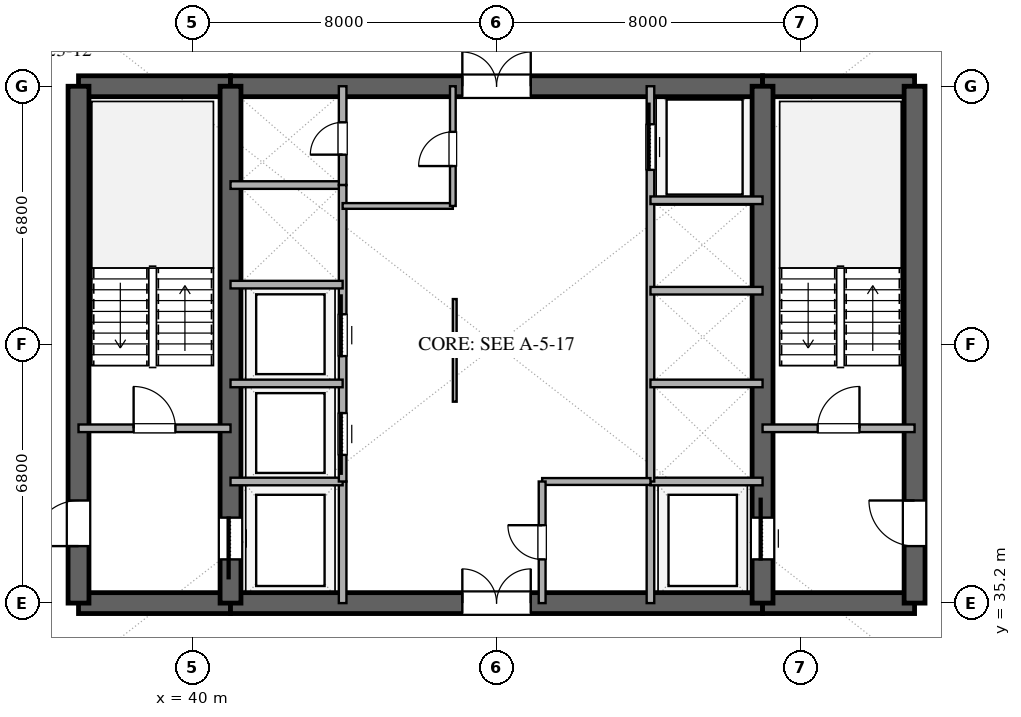
"""IFC4 building model, lengths in metres.
Left out: names, types, materials, properties, quantities, classifications, styles, units other than length and angle.
Written with IfcOpenShell. Run it as: python <this file> out.ifc"""

import sys

from ifc_helpers import new_model, si_unit, direction, frame, frame_2d, origin, place, context, subcontext, project, spatial, rectangle, extrude, element, fill, save


model = new_model("IFC4")
c1 = context("Model", 3, precision=1e-05, world=origin(), true_north=direction((0.0, 1.0)))
c2 = subcontext(c1, "Body", "Model", "MODEL_VIEW")
j1 = project(units=[si_unit("LENGTHUNIT", "METRE"), si_unit("PLANEANGLEUNIT", "RADIAN")], contexts=[c1])
p1 = place(None, origin())
s1 = spatial("IfcSite", under=j1, at=p1, CompositionType="ELEMENT")
p2 = place(p1, origin())
s2 = spatial("IfcBuilding", under=s1, at=p2, CompositionType="ELEMENT")
p3 = place(p2, frame((0.0, 0.0, 94.8)))
s3 = spatial("IfcBuildingStorey", under=s2, at=p3, CompositionType="ELEMENT", Elevation=94.8)
p4 = place(p3, frame((37.0, 35.2, 0.0), z_axis=(0.0, 0.0, 1.0), x_axis=(1.0, 0.0, 0.0)))
e1 = element("IfcWall", 1, at=p4, inside=s3, PredefinedType="SHEAR", context=c2, shape_type="SweptSolid", body=[
    extrude(rectangle(XDim=4.0, YDim=0.55, at=frame_2d((2.0, 0.0))), origin(), (0.0, 0.0, 1.0), 3.38),
])
p5 = place(p3, frame((41.0, 35.2, 0.0), z_axis=(0.0, 0.0, 1.0), x_axis=(1.0, 0.0, 0.0)))
e2 = element("IfcWall", 2, at=p5, inside=s3, PredefinedType="SHEAR", context=c2, shape_type="SweptSolid", body=[
    extrude(rectangle(XDim=14.0, YDim=0.55, at=frame_2d((7.0, 0.0))), origin(), (0.0, 0.0, 1.0), 3.38),
])
p6 = place(p5, frame((6.1, 0.0, 0.0)))
e3 = element("IfcOpeningElement", 3, at=p6, cuts=e2, PredefinedType="OPENING", context=c2, shape_type="SweptSolid", body=[
    extrude(rectangle(XDim=1.8, YDim=2.25, at=frame_2d((0.9, 1.125))), frame((0.0, 0.285, 0.0), z_axis=(0.0, -1.0, 0.0), x_axis=(1.0, 0.0, 0.0)), (0.0, 0.0, 1.0), 0.57),
])
for number, where, z_axis, x_axis in (
    (4, (55.0, 35.2, 0.0), (0.0, 0.0, 1.0), (1.0, 0.0, 0.0)),
    (5, (37.0, 48.8, 0.0), (0.0, 0.0, 1.0), (1.0, 0.0, 0.0)),
):
    element("IfcWall", number, at=place(p3, frame(where, z_axis=z_axis, x_axis=x_axis)), inside=s3, PredefinedType="SHEAR", context=c2, shape_type="SweptSolid", body=[
        extrude(rectangle(XDim=4.0, YDim=0.55, at=frame_2d((2.0, 0.0))), origin(), (0.0, 0.0, 1.0), 3.38),
    ])
p7 = place(p3, frame((41.0, 48.8, 0.0), z_axis=(0.0, 0.0, 1.0), x_axis=(1.0, 0.0, 0.0)))
e6 = element("IfcWall", 6, at=p7, inside=s3, PredefinedType="SHEAR", context=c2, shape_type="SweptSolid", body=[
    extrude(rectangle(XDim=14.0, YDim=0.55, at=frame_2d((7.0, 0.0))), origin(), (0.0, 0.0, 1.0), 3.38),
])
p8 = place(p7, frame((6.1, 0.0, 0.0)))
e7 = element("IfcOpeningElement", 7, at=p8, cuts=e6, PredefinedType="OPENING", context=c2, shape_type="SweptSolid", body=[
    extrude(rectangle(XDim=1.8, YDim=2.25, at=frame_2d((0.9, 1.125))), frame((0.0, 0.285, 0.0), z_axis=(0.0, -1.0, 0.0), x_axis=(1.0, 0.0, 0.0)), (0.0, 0.0, 1.0), 0.57),
])
p9 = place(p3, frame((55.0, 48.8, 0.0), z_axis=(0.0, 0.0, 1.0), x_axis=(1.0, 0.0, 0.0)))
e8 = element("IfcWall", 8, at=p9, inside=s3, PredefinedType="SHEAR", context=c2, shape_type="SweptSolid", body=[
    extrude(rectangle(XDim=4.0, YDim=0.55, at=frame_2d((2.0, 0.0))), origin(), (0.0, 0.0, 1.0), 3.38),
])
p10 = place(p3, frame((37.0, 35.2, 0.0), z_axis=(0.0, 0.0, 1.0), x_axis=(0.0, 1.0, 0.0)))
e9 = element("IfcWall", 9, at=p10, inside=s3, PredefinedType="SHEAR", context=c2, shape_type="SweptSolid", body=[
    extrude(rectangle(XDim=13.6, YDim=0.55, at=frame_2d((6.8, 0.0))), origin(), (0.0, 0.0, 1.0), 3.38),
])
p11 = place(p10, frame((1.5, 0.0, 0.0)))
e10 = element("IfcOpeningElement", 10, at=p11, cuts=e9, PredefinedType="OPENING", context=c2, shape_type="SweptSolid", body=[
    extrude(rectangle(XDim=1.2, YDim=2.15, at=frame_2d((0.6, 1.075))), frame((0.0, 0.285, 0.0), z_axis=(0.0, -1.0, 0.0), x_axis=(1.0, 0.0, 0.0)), (0.0, 0.0, 1.0), 0.57),
])
p12 = place(p3, frame((59.0, 35.2, 0.0), z_axis=(0.0, 0.0, 1.0), x_axis=(0.0, 1.0, 0.0)))
e11 = element("IfcWall", 11, at=p12, inside=s3, PredefinedType="SHEAR", context=c2, shape_type="SweptSolid", body=[
    extrude(rectangle(XDim=13.6, YDim=0.55, at=frame_2d((6.8, 0.0))), origin(), (0.0, 0.0, 1.0), 3.38),
])
p13 = place(p12, frame((1.5, 0.0, 0.0)))
e12 = element("IfcOpeningElement", 12, at=p13, cuts=e11, PredefinedType="OPENING", context=c2, shape_type="SweptSolid", body=[
    extrude(rectangle(XDim=1.2, YDim=2.15, at=frame_2d((0.6, 1.075))), frame((0.0, 0.285, 0.0), z_axis=(0.0, -1.0, 0.0), x_axis=(1.0, 0.0, 0.0)), (0.0, 0.0, 1.0), 0.57),
])
p14 = place(p3, frame((41.0, 35.2, 0.0), z_axis=(0.0, 0.0, 1.0), x_axis=(0.0, 1.0, 0.0)))
e13 = element("IfcWall", 13, at=p14, inside=s3, PredefinedType="SHEAR", context=c2, shape_type="SweptSolid", body=[
    extrude(rectangle(XDim=13.6, YDim=0.55, at=frame_2d((6.8, 0.0))), origin(), (0.0, 0.0, 1.0), 3.38),
])
p15 = place(p14, frame((1.15, 0.0, 0.0)))
e14 = element("IfcOpeningElement", 14, at=p15, cuts=e13, PredefinedType="OPENING", context=c2, shape_type="SweptSolid", body=[
    extrude(rectangle(XDim=1.1, YDim=2.2, at=frame_2d((0.55, 1.1))), frame((0.0, 0.285, 0.0), z_axis=(0.0, -1.0, 0.0), x_axis=(1.0, 0.0, 0.0)), (0.0, 0.0, 1.0), 0.57),
])
p16 = place(p3, frame((55.0, 35.2, 0.0), z_axis=(0.0, 0.0, 1.0), x_axis=(0.0, 1.0, 0.0)))
e15 = element("IfcWall", 15, at=p16, inside=s3, PredefinedType="SHEAR", context=c2, shape_type="SweptSolid", body=[
    extrude(rectangle(XDim=13.6, YDim=0.55, at=frame_2d((6.8, 0.0))), origin(), (0.0, 0.0, 1.0), 3.38),
])
p17 = place(p16, frame((1.15, 0.0, 0.0)))
e16 = element("IfcOpeningElement", 16, at=p17, cuts=e15, PredefinedType="OPENING", context=c2, shape_type="SweptSolid", body=[
    extrude(rectangle(XDim=1.1, YDim=2.2, at=frame_2d((0.55, 1.1))), frame((0.0, 0.285, 0.0), z_axis=(0.0, -1.0, 0.0), x_axis=(1.0, 0.0, 0.0)), (0.0, 0.0, 1.0), 0.57),
])
p18 = place(p3, frame((37.0, 39.8, 0.0), z_axis=(0.0, 0.0, 1.0), x_axis=(1.0, 0.0, 0.0)))
e17 = element("IfcWall", 17, at=p18, inside=s3, PredefinedType="SOLIDWALL", context=c2, shape_type="SweptSolid", body=[
    extrude(rectangle(XDim=4.0, YDim=0.2, at=frame_2d((2.0, 0.0))), origin(), (0.0, 0.0, 1.0), 2.74),
])
p19 = place(p18, frame((1.45, 0.0, 0.0)))
e18 = element("IfcOpeningElement", 18, at=p19, cuts=e17, PredefinedType="OPENING", context=c2, shape_type="SweptSolid", body=[
    extrude(rectangle(XDim=1.1, YDim=2.15, at=frame_2d((0.55, 1.075))), frame((0.0, 0.11, 0.0), z_axis=(0.0, -1.0, 0.0), x_axis=(1.0, 0.0, 0.0)), (0.0, 0.0, 1.0), 0.22),
])
p20 = place(p3, frame((55.0, 39.8, 0.0), z_axis=(0.0, 0.0, 1.0), x_axis=(1.0, 0.0, 0.0)))
e19 = element("IfcWall", 19, at=p20, inside=s3, PredefinedType="SOLIDWALL", context=c2, shape_type="SweptSolid", body=[
    extrude(rectangle(XDim=4.0, YDim=0.2, at=frame_2d((2.0, 0.0))), origin(), (0.0, 0.0, 1.0), 2.74),
])
p21 = place(p20, frame((1.45, 0.0, 0.0)))
e20 = element("IfcOpeningElement", 20, at=p21, cuts=e19, PredefinedType="OPENING", context=c2, shape_type="SweptSolid", body=[
    extrude(rectangle(XDim=1.1, YDim=2.15, at=frame_2d((0.55, 1.075))), frame((0.0, 0.11, 0.0), z_axis=(0.0, -1.0, 0.0), x_axis=(1.0, 0.0, 0.0)), (0.0, 0.0, 1.0), 0.22),
])
p22 = place(p3, frame((43.95, 35.2, 0.0), z_axis=(0.0, 0.0, 1.0), x_axis=(0.0, 1.0, 0.0)))
e21 = element("IfcWall", 21, at=p22, inside=s3, PredefinedType="SOLIDWALL", context=c2, shape_type="SweptSolid", body=[
    extrude(rectangle(XDim=3.2, YDim=0.2, at=frame_2d((1.6, 0.0))), origin(), (0.0, 0.0, 1.0), 2.74),
])
p23 = place(p3, frame((41.0, 38.4, 0.0), z_axis=(0.0, 0.0, 1.0), x_axis=(1.0, 0.0, 0.0)))
e22 = element("IfcWall", 22, at=p23, inside=s3, PredefinedType="SOLIDWALL", context=c2, shape_type="SweptSolid", body=[
    extrude(rectangle(XDim=2.95, YDim=0.2, at=frame_2d((1.475, 0.0))), origin(), (0.0, 0.0, 1.0), 2.74),
])
p24 = place(p3, frame((52.05, 35.2, 0.0), z_axis=(0.0, 0.0, 1.0), x_axis=(0.0, 1.0, 0.0)))
e23 = element("IfcWall", 23, at=p24, inside=s3, PredefinedType="SOLIDWALL", context=c2, shape_type="SweptSolid", body=[
    extrude(rectangle(XDim=3.2, YDim=0.2, at=frame_2d((1.6, 0.0))), origin(), (0.0, 0.0, 1.0), 2.74),
])
for number, where, z_axis, x_axis in (
    (24, (52.05, 38.4, 0.0), (0.0, 0.0, 1.0), (1.0, 0.0, 0.0)),
    (25, (41.0, 46.2, 0.0), (0.0, 0.0, 1.0), (1.0, 0.0, 0.0)),
):
    element("IfcWall", number, at=place(p3, frame(where, z_axis=z_axis, x_axis=x_axis)), inside=s3, PredefinedType="SOLIDWALL", context=c2, shape_type="SweptSolid", body=[
        extrude(rectangle(XDim=2.95, YDim=0.2, at=frame_2d((1.475, 0.0))), origin(), (0.0, 0.0, 1.0), 2.74),
    ])
p25 = place(p3, frame((43.95, 46.2, 0.0), z_axis=(0.0, 0.0, 1.0), x_axis=(0.0, 1.0, 0.0)))
e26 = element("IfcWall", 26, at=p25, inside=s3, PredefinedType="SOLIDWALL", context=c2, shape_type="SweptSolid", body=[
    extrude(rectangle(XDim=2.6, YDim=0.2, at=frame_2d((1.3, 0.0))), origin(), (0.0, 0.0, 1.0), 2.74),
])
p26 = place(p25, frame((0.8, 0.0, 0.0)))
e27 = element("IfcOpeningElement", 27, at=p26, cuts=e26, PredefinedType="OPENING", context=c2, shape_type="SweptSolid", body=[
    extrude(rectangle(XDim=0.85, YDim=2.15, at=frame_2d((0.425, 1.075))), frame((0.0, 0.11, 0.0), z_axis=(0.0, -1.0, 0.0), x_axis=(1.0, 0.0, 0.0)), (0.0, 0.0, 1.0), 0.22),
])
p27 = place(p3, frame((43.95, 38.4, 0.0), z_axis=(0.0, 0.0, 1.0), x_axis=(0.0, 1.0, 0.0)))
e28 = element("IfcWall", 28, at=p27, inside=s3, PredefinedType="SOLIDWALL", context=c2, shape_type="SweptSolid", body=[
    extrude(rectangle(XDim=7.8, YDim=0.2, at=frame_2d((3.9, 0.0))), origin(), (0.0, 0.0, 1.0), 2.74),
])
p28 = place(p27, frame((0.7, 0.0, 0.0)))
e29 = element("IfcOpeningElement", 29, at=p28, cuts=e28, PredefinedType="OPENING", context=c2, shape_type="SweptSolid", body=[
    extrude(rectangle(XDim=1.1, YDim=2.2, at=frame_2d((0.55, 1.1))), frame((0.0, 0.11, 0.0), z_axis=(0.0, -1.0, 0.0), x_axis=(1.0, 0.0, 0.0)), (0.0, 0.0, 1.0), 0.22),
])
p29 = place(p27, frame((3.3, 0.0, 0.0)))
e30 = element("IfcOpeningElement", 30, at=p29, cuts=e28, PredefinedType="OPENING", context=c2, shape_type="SweptSolid", body=[
    extrude(rectangle(XDim=1.1, YDim=2.2, at=frame_2d((0.55, 1.1))), frame((0.0, 0.11, 0.0), z_axis=(0.0, -1.0, 0.0), x_axis=(1.0, 0.0, 0.0)), (0.0, 0.0, 1.0), 0.22),
])
for number, where, z_axis, x_axis in (
    (31, (41.0, 40.98, 0.0), (0.0, 0.0, 1.0), (1.0, 0.0, 0.0)),
    (32, (41.0, 43.58, 0.0), (0.0, 0.0, 1.0), (1.0, 0.0, 0.0)),
):
    element("IfcWall", number, at=place(p3, frame(where, z_axis=z_axis, x_axis=x_axis)), inside=s3, PredefinedType="SOLIDWALL", context=c2, shape_type="SweptSolid", body=[
        extrude(rectangle(XDim=2.95, YDim=0.2, at=frame_2d((1.475, 0.0))), origin(), (0.0, 0.0, 1.0), 2.74),
    ])
p30 = place(p3, frame((52.05, 38.4, 0.0), z_axis=(0.0, 0.0, 1.0), x_axis=(0.0, 1.0, 0.0)))
e33 = element("IfcWall", 33, at=p30, inside=s3, PredefinedType="SOLIDWALL", context=c2, shape_type="SweptSolid", body=[
    extrude(rectangle(XDim=10.4, YDim=0.2, at=frame_2d((5.2, 0.0))), origin(), (0.0, 0.0, 1.0), 2.74),
])
p31 = place(p30, frame((8.2, 0.0, 0.0)))
e34 = element("IfcOpeningElement", 34, at=p31, cuts=e33, PredefinedType="OPENING", context=c2, shape_type="SweptSolid", body=[
    extrude(rectangle(XDim=1.2, YDim=2.2, at=frame_2d((0.6, 1.1))), frame((0.0, 0.11, 0.0), z_axis=(0.0, -1.0, 0.0), x_axis=(1.0, 0.0, 0.0)), (0.0, 0.0, 1.0), 0.22),
])
for number, where, z_axis, x_axis in (
    (35, (52.05, 40.98, 0.0), (0.0, 0.0, 1.0), (1.0, 0.0, 0.0)),
    (36, (52.05, 43.42, 0.0), (0.0, 0.0, 1.0), (1.0, 0.0, 0.0)),
    (37, (52.05, 45.8, 0.0), (0.0, 0.0, 1.0), (1.0, 0.0, 0.0)),
):
    element("IfcWall", number, at=place(p3, frame(where, z_axis=z_axis, x_axis=x_axis)), inside=s3, PredefinedType="SOLIDWALL", context=c2, shape_type="SweptSolid", body=[
        extrude(rectangle(XDim=2.95, YDim=0.2, at=frame_2d((1.475, 0.0))), origin(), (0.0, 0.0, 1.0), 2.74),
    ])
p32 = place(p3, frame((43.95, 45.65, 0.0), z_axis=(0.0, 0.0, 1.0), x_axis=(1.0, 0.0, 0.0)))
e38 = element("IfcWall", 38, at=p32, inside=s3, PredefinedType="PARTITIONING", context=c2, shape_type="SweptSolid", body=[
    extrude(rectangle(XDim=2.9, YDim=0.15, at=frame_2d((1.45, 0.0))), origin(), (0.0, 0.0, 1.0), 2.74),
])
p33 = place(p3, frame((46.85, 45.65, 0.0), z_axis=(0.0, 0.0, 1.0), x_axis=(0.0, 1.0, 0.0)))
e39 = element("IfcWall", 39, at=p33, inside=s3, PredefinedType="PARTITIONING", context=c2, shape_type="SweptSolid", body=[
    extrude(rectangle(XDim=3.15, YDim=0.15, at=frame_2d((1.575, 0.0))), origin(), (0.0, 0.0, 1.0), 2.74),
])
p34 = place(p33, frame((1.05, 0.0, 0.0)))
e40 = element("IfcOpeningElement", 40, at=p34, cuts=e39, PredefinedType="OPENING", context=c2, shape_type="SweptSolid", body=[
    extrude(rectangle(XDim=0.9, YDim=2.15, at=frame_2d((0.45, 1.075))), frame((0.0, 0.085, 0.0), z_axis=(0.0, -1.0, 0.0), x_axis=(1.0, 0.0, 0.0)), (0.0, 0.0, 1.0), 0.17),
])
p35 = place(p3, frame((49.2, 38.4, 0.0), z_axis=(0.0, 0.0, 1.0), x_axis=(1.0, 0.0, 0.0)))
e41 = element("IfcWall", 41, at=p35, inside=s3, PredefinedType="PLUMBINGWALL", context=c2, shape_type="SweptSolid", body=[
    extrude(rectangle(XDim=2.85, YDim=0.18, at=frame_2d((1.425, 0.0))), origin(), (0.0, 0.0, 1.0), 2.74),
])
p36 = place(p3, frame((49.2, 35.2, 0.0), z_axis=(0.0, 0.0, 1.0), x_axis=(0.0, 1.0, 0.0)))
e42 = element("IfcWall", 42, at=p36, inside=s3, PredefinedType="PLUMBINGWALL", context=c2, shape_type="SweptSolid", body=[
    extrude(rectangle(XDim=3.2, YDim=0.18, at=frame_2d((1.6, 0.0))), origin(), (0.0, 0.0, 1.0), 2.74),
])
p37 = place(p36, frame((1.15, 0.0, 0.0)))
e43 = element("IfcOpeningElement", 43, at=p37, cuts=e42, PredefinedType="OPENING", context=c2, shape_type="SweptSolid", body=[
    extrude(rectangle(XDim=0.9, YDim=2.1, at=frame_2d((0.45, 1.05))), frame((0.0, 0.1, 0.0), z_axis=(0.0, -1.0, 0.0), x_axis=(1.0, 0.0, 0.0)), (0.0, 0.0, 1.0), 0.2),
])
p38 = place(p3, frame((46.9, 40.5, 0.0), z_axis=(0.0, 0.0, 1.0), x_axis=(0.0, 1.0, 0.0)))
e44 = element("IfcWall", 44, at=p38, inside=s3, PredefinedType="MOVABLE", context=c2, shape_type="SweptSolid", body=[
    extrude(rectangle(XDim=2.7, YDim=0.1, at=frame_2d((1.35, 0.0))), origin(), (0.0, 0.0, 1.0), 2.74),
])
p39 = place(p15, origin())
e45 = element("IfcDoor", 45, at=p39, inside=s3, OperationType="SLIDING_TO_LEFT", PredefinedType="DOOR", context=c2, shape_type="SweptSolid", body=[
    extrude(rectangle(XDim=1.1, YDim=2.2, at=frame_2d((0.55, 1.1))), frame((0.0, 0.025, 0.0), z_axis=(0.0, -1.0, 0.0), x_axis=(1.0, 0.0, 0.0)), (0.0, 0.0, 1.0), 0.05),
])
fill(e14, e45)
p40 = place(p17, origin())
e46 = element("IfcDoor", 46, at=p40, inside=s3, OperationType="SLIDING_TO_RIGHT", PredefinedType="DOOR", context=c2, shape_type="SweptSolid", body=[
    extrude(rectangle(XDim=1.1, YDim=2.2, at=frame_2d((0.55, 1.1))), frame((0.0, 0.025, 0.0), z_axis=(0.0, -1.0, 0.0), x_axis=(1.0, 0.0, 0.0)), (0.0, 0.0, 1.0), 0.05),
])
fill(e16, e46)
p41 = place(p11, origin())
e47 = element("IfcDoor", 47, at=p41, inside=s3, OperationType="SINGLE_SWING_LEFT", PredefinedType="DOOR", context=c2, shape_type="SweptSolid", body=[
    extrude(rectangle(XDim=1.2, YDim=2.15, at=frame_2d((0.6, 1.075))), frame((0.0, 0.025, 0.0), z_axis=(0.0, -1.0, 0.0), x_axis=(1.0, 0.0, 0.0)), (0.0, 0.0, 1.0), 0.05),
])
fill(e10, e47)
p42 = place(p13, origin())
e48 = element("IfcDoor", 48, at=p42, inside=s3, OperationType="SINGLE_SWING_RIGHT", PredefinedType="DOOR", context=c2, shape_type="SweptSolid", body=[
    extrude(rectangle(XDim=1.2, YDim=2.15, at=frame_2d((0.6, 1.075))), frame((0.0, 0.025, 0.0), z_axis=(0.0, -1.0, 0.0), x_axis=(1.0, 0.0, 0.0)), (0.0, 0.0, 1.0), 0.05),
])
fill(e12, e48)
p43 = place(p6, origin())
e49 = element("IfcDoor", 49, at=p43, inside=s3, OperationType="DOUBLE_DOOR_SINGLE_SWING", PredefinedType="DOOR", context=c2, shape_type="SweptSolid", body=[
    extrude(rectangle(XDim=1.8, YDim=2.25, at=frame_2d((0.9, 1.125))), frame((0.0, 0.025, 0.0), z_axis=(0.0, -1.0, 0.0), x_axis=(1.0, 0.0, 0.0)), (0.0, 0.0, 1.0), 0.05),
])
fill(e3, e49)
p44 = place(p8, origin())
e50 = element("IfcDoor", 50, at=p44, inside=s3, OperationType="DOUBLE_DOOR_SINGLE_SWING", PredefinedType="DOOR", context=c2, shape_type="SweptSolid", body=[
    extrude(rectangle(XDim=1.8, YDim=2.25, at=frame_2d((0.9, 1.125))), frame((0.0, 0.025, 0.0), z_axis=(0.0, -1.0, 0.0), x_axis=(1.0, 0.0, 0.0)), (0.0, 0.0, 1.0), 0.05),
])
fill(e7, e50)
p45 = place(p19, origin())
e51 = element("IfcDoor", 51, at=p45, inside=s3, OperationType="SINGLE_SWING_LEFT", PredefinedType="DOOR", context=c2, shape_type="SweptSolid", body=[
    extrude(rectangle(XDim=1.1, YDim=2.15, at=frame_2d((0.55, 1.075))), frame((0.0, 0.025, 0.0), z_axis=(0.0, -1.0, 0.0), x_axis=(1.0, 0.0, 0.0)), (0.0, 0.0, 1.0), 0.05),
])
fill(e18, e51)
p46 = place(p21, origin())
e52 = element("IfcDoor", 52, at=p46, inside=s3, OperationType="SINGLE_SWING_RIGHT", PredefinedType="DOOR", context=c2, shape_type="SweptSolid", body=[
    extrude(rectangle(XDim=1.1, YDim=2.15, at=frame_2d((0.55, 1.075))), frame((0.0, 0.025, 0.0), z_axis=(0.0, -1.0, 0.0), x_axis=(1.0, 0.0, 0.0)), (0.0, 0.0, 1.0), 0.05),
])
fill(e20, e52)
p47 = place(p26, origin())
e53 = element("IfcDoor", 53, at=p47, inside=s3, OperationType="SINGLE_SWING_LEFT", PredefinedType="DOOR", context=c2, shape_type="SweptSolid", body=[
    extrude(rectangle(XDim=0.85, YDim=2.15, at=frame_2d((0.425, 1.075))), frame((0.0, 0.025, 0.0), z_axis=(0.0, -1.0, 0.0), x_axis=(1.0, 0.0, 0.0)), (0.0, 0.0, 1.0), 0.05),
])
fill(e27, e53)
p48 = place(p28, origin())
e54 = element("IfcDoor", 54, at=p48, inside=s3, OperationType="SLIDING_TO_LEFT", PredefinedType="DOOR", context=c2, shape_type="SweptSolid", body=[
    extrude(rectangle(XDim=1.1, YDim=2.2, at=frame_2d((0.55, 1.1))), frame((0.0, 0.025, 0.0), z_axis=(0.0, -1.0, 0.0), x_axis=(1.0, 0.0, 0.0)), (0.0, 0.0, 1.0), 0.05),
])
fill(e29, e54)
p49 = place(p29, origin())
e55 = element("IfcDoor", 55, at=p49, inside=s3, OperationType="SLIDING_TO_RIGHT", PredefinedType="DOOR", context=c2, shape_type="SweptSolid", body=[
    extrude(rectangle(XDim=1.1, YDim=2.2, at=frame_2d((0.55, 1.1))), frame((0.0, 0.025, 0.0), z_axis=(0.0, -1.0, 0.0), x_axis=(1.0, 0.0, 0.0)), (0.0, 0.0, 1.0), 0.05),
])
fill(e30, e55)
p50 = place(p31, origin())
e56 = element("IfcDoor", 56, at=p50, inside=s3, OperationType="SLIDING_TO_RIGHT", PredefinedType="DOOR", context=c2, shape_type="SweptSolid", body=[
    extrude(rectangle(XDim=1.2, YDim=2.2, at=frame_2d((0.6, 1.1))), frame((0.0, 0.025, 0.0), z_axis=(0.0, -1.0, 0.0), x_axis=(1.0, 0.0, 0.0)), (0.0, 0.0, 1.0), 0.05),
])
fill(e34, e56)
p51 = place(p34, origin())
e57 = element("IfcDoor", 57, at=p51, inside=s3, OperationType="SINGLE_SWING_LEFT", PredefinedType="DOOR", context=c2, shape_type="SweptSolid", body=[
    extrude(rectangle(XDim=0.9, YDim=2.15, at=frame_2d((0.45, 1.075))), frame((0.0, 0.025, 0.0), z_axis=(0.0, -1.0, 0.0), x_axis=(1.0, 0.0, 0.0)), (0.0, 0.0, 1.0), 0.05),
])
fill(e40, e57)
p52 = place(p37, origin())
e58 = element("IfcDoor", 58, at=p52, inside=s3, OperationType="SINGLE_SWING_RIGHT", PredefinedType="DOOR", context=c2, shape_type="SweptSolid", body=[
    extrude(rectangle(XDim=0.9, YDim=2.1, at=frame_2d((0.45, 1.05))), frame((0.0, 0.025, 0.0), z_axis=(0.0, -1.0, 0.0), x_axis=(1.0, 0.0, 0.0)), (0.0, 0.0, 1.0), 0.05),
])
fill(e43, e58)
save(model, sys.argv[1])
